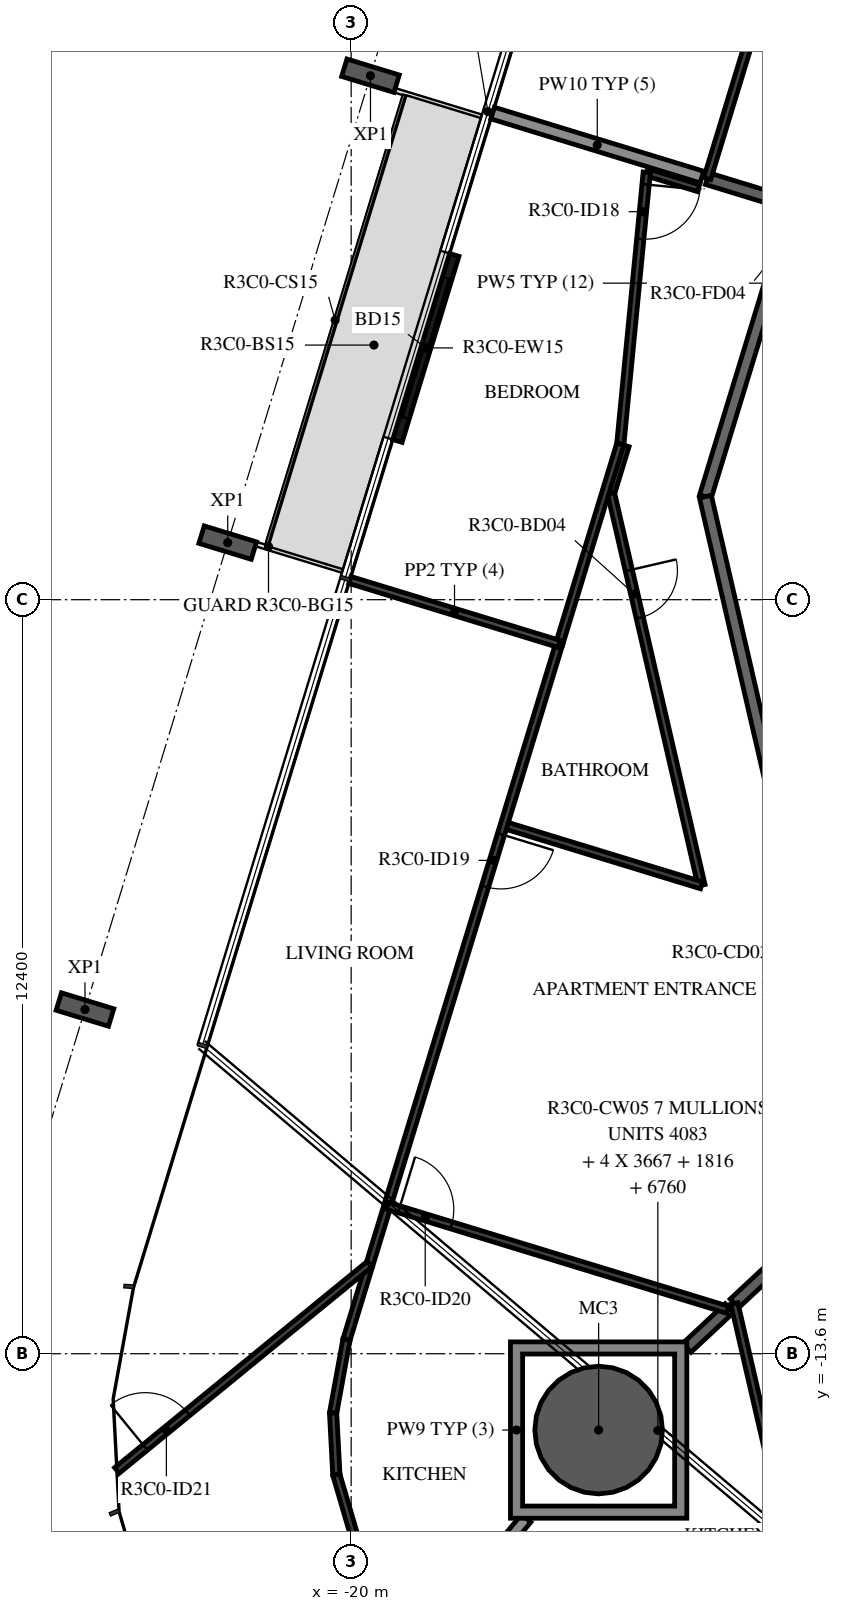
"""IFC4 building model, lengths in metres.
Left out: names, types, materials, properties, quantities, classifications, styles, units other than length and angle.
Written with IfcOpenShell. Run it as: python <this file> out.ifc"""

import sys

from ifc_helpers import new_model, si_unit, direction, frame, frame_2d, origin, origin_2d, place, context, subcontext, project, spatial, polyline, rectangle, hollow_circle, i_section, outline, extrude, element, fill, save


model = new_model("IFC4")
c1 = context("Model", 3, precision=1e-05, world=origin(), true_north=direction((0.0, 1.0)))
c2 = subcontext(c1, "Body", "Model", "MODEL_VIEW")
j1 = project(units=[si_unit("LENGTHUNIT", "METRE"), si_unit("PLANEANGLEUNIT", "RADIAN")], contexts=[c1])
p1 = place(None, origin())
s1 = spatial("IfcSite", under=j1, at=p1, CompositionType="ELEMENT")
p2 = place(p1, origin())
s2 = spatial("IfcBuilding", under=s1, at=p2, CompositionType="ELEMENT")
p3 = place(p2, frame((0.0, 0.0, 134.4)))
s3 = spatial("IfcBuildingStorey", under=s2, at=p3, CompositionType="ELEMENT", Elevation=134.4)
p4 = place(p3, frame((-15.93, -14.855, -0.38), z_axis=(0.0, 0.0, 1.0), x_axis=(1.0, 0.0, 0.0)))
e1 = element("IfcColumn", 1, at=p4, inside=s3, PredefinedType="COLUMN", context=c2, shape_type="SweptSolid", body=[
    extrude(hollow_circle(Radius=1.05, WallThickness=0.05, at=origin_2d()), origin(), (0.0, 0.0, 1.0), 3.5),
])
for number, where, z_axis, x_axis in (
    (2, (-19.682, 7.417, -0.38), (0.0, 0.0, 1.0), (0.292, 0.956, 0.0)),
    (3, (-22.03, -0.261, -0.38), (0.0, 0.0, 1.0), (0.292, 0.956, 0.0)),
    (4, (-24.377, -7.94, -0.38), (0.0, 0.0, 1.0), (0.292, 0.956, 0.0)),
):
    element("IfcColumn", number, at=place(p3, frame(where, z_axis=z_axis, x_axis=x_axis)), inside=s3, PredefinedType="COLUMN", context=c2, shape_type="SweptSolid", body=[
        extrude(i_section(OverallWidth=0.3, OverallDepth=0.9, WebThickness=0.019, FlangeThickness=0.035, FilletRadius=0.03, at=origin_2d()), origin(), (0.0, 0.0, 1.0), 3.5),
    ])
p5 = place(p3, frame((-18.304, 4.47, 0.0), z_axis=(0.0, 0.0, 1.0), x_axis=(-0.292348395078, -0.956311882126, 0.0)))
e5 = element("IfcWall", 5, at=p5, inside=s3, PredefinedType="STANDARD", context=c2, shape_type="SweptSolid", body=[
    extrude(rectangle(XDim=3.2, YDim=0.16, at=frame_2d((1.6, 0.0))), origin(), (0.0, 0.0, 1.0), 3.12),
])
p6 = place(p5, frame((0.4, 0.0, 0.0)))
e6 = element("IfcOpeningElement", 6, at=p6, cuts=e5, PredefinedType="OPENING", context=c2, shape_type="SweptSolid", body=[
    extrude(rectangle(XDim=2.4, YDim=2.4, at=frame_2d((1.2, 1.2))), frame((0.0, 0.09, 0.0), z_axis=(0.0, -1.0, 0.0), x_axis=(1.0, 0.0, 0.0)), (0.0, 0.0, 1.0), 0.18),
])
p7 = place(p3, frame((-12.028, 7.516, 0.0), z_axis=(0.0, 0.0, 1.0), x_axis=(-0.292365533182, -0.956306642771, 0.0)))
e7 = element("IfcWall", 7, at=p7, inside=s3, PredefinedType="STANDARD", context=c2, shape_type="SweptSolid", body=[
    extrude(rectangle(XDim=7.342, YDim=0.2, at=frame_2d((3.671, 0.0))), origin(), (0.0, 0.0, 1.0), 3.12),
])
p8 = place(p7, frame((2.533, 0.0, 0.0)))
e8 = element("IfcOpeningElement", 8, at=p8, cuts=e7, PredefinedType="OPENING", context=c2, shape_type="SweptSolid", body=[
    extrude(rectangle(XDim=1.0, YDim=2.1, at=frame_2d((0.5, 1.05))), frame((0.0, 0.11, 0.0), z_axis=(0.0, -1.0, 0.0), x_axis=(1.0, 0.0, 0.0)), (0.0, 0.0, 1.0), 0.22),
])
p9 = place(p3, frame((-14.175, 0.495, 0.0), z_axis=(0.0, 0.0, 1.0), x_axis=(0.224922649383, -0.974376622151, 0.0)))
e9 = element("IfcWall", 9, at=p9, inside=s3, PredefinedType="STANDARD", context=c2, shape_type="SweptSolid", body=[
    extrude(rectangle(XDim=7.342, YDim=0.2, at=frame_2d((3.671, 0.0))), origin(), (0.0, 0.0, 1.0), 3.12),
])
p10 = place(p3, frame((-14.145, 5.724, 0.0), z_axis=(0.0, 0.0, 1.0), x_axis=(0.956266872747, -0.292495586439, 0.0)))
e10 = element("IfcWall", 10, at=p10, inside=s3, PredefinedType="STANDARD", context=c2, shape_type="SweptSolid", body=[
    extrude(rectangle(XDim=1.5, YDim=0.2, at=frame_2d((0.75, 0.0))), origin(), (0.0, 0.0, 1.0), 3.12),
])
p11 = place(p3, frame((-17.674, 6.803, 0.0), z_axis=(0.0, 0.0, 1.0), x_axis=(0.956293645939, -0.292408041504, 0.0)))
e11 = element("IfcWall", 11, at=p11, inside=s3, PredefinedType="STANDARD", context=c2, shape_type="SweptSolid", body=[
    extrude(rectangle(XDim=3.6, YDim=0.2, at=frame_2d((1.8, 0.0))), origin(), (0.0, 0.0, 1.0), 2.73),
])
p12 = place(p3, frame((-13.699, -12.774, 0.0), z_axis=(0.0, 0.0, 1.0), x_axis=(0.731353758457, 0.681998299111, 0.0)))
e12 = element("IfcWall", 12, at=p12, inside=s3, PredefinedType="STANDARD", context=c2, shape_type="SweptSolid", body=[
    extrude(rectangle(XDim=5.031, YDim=0.2, at=frame_2d((2.515, 0.0))), origin(), (0.0, 0.0, 1.0), 3.12),
])
p13 = place(p3, frame((-21.0, -21.025, 0.0), z_axis=(0.0, 0.0, 1.0), x_axis=(0.634846795952, 0.772638043116, 0.0)))
e13 = element("IfcWall", 13, at=p13, inside=s3, PredefinedType="STANDARD", context=c2, shape_type="SweptSolid", body=[
    extrude(rectangle(XDim=6.109, YDim=0.2, at=frame_2d((3.055, 0.0))), origin(), (0.0, 0.0, 1.0), 2.73),
])
p14 = place(p3, frame((-14.48, -13.503, 0.0), z_axis=(0.0, 0.0, 1.0), x_axis=(0.73152991834, 0.681809341806, 0.0)))
e14 = element("IfcWall", 14, at=p14, inside=s3, PredefinedType="STANDARD", context=c2, shape_type="SweptSolid", body=[
    extrude(rectangle(XDim=0.958, YDim=0.2, at=frame_2d((0.479, 0.0))), origin(), (0.0, 0.0, 1.0), 3.12),
])
p15 = place(p3, frame((-13.345, 8.339, 0.0), z_axis=(0.0, 0.0, 1.0), x_axis=(-0.292316072367, -0.956321762712, 0.0)))
e15 = element("IfcWall", 15, at=p15, inside=s3, PredefinedType="PARTITIONING", context=c2, shape_type="SweptSolid", body=[
    extrude(rectangle(XDim=2.734, YDim=0.12, at=frame_2d((1.367, 0.0))), origin(), (0.0, 0.0, 1.0), 3.12),
])
p16 = place(p3, frame((-14.287, 5.568, 0.0), z_axis=(0.0, 0.0, 1.0), x_axis=(-0.956287662261, 0.292427609859, 0.0)))
e16 = element("IfcWall", 16, at=p16, inside=s3, PredefinedType="PARTITIONING", context=c2, shape_type="SweptSolid", body=[
    extrude(rectangle(XDim=0.89, YDim=0.12, at=frame_2d((0.445, 0.0))), origin(), (0.0, 0.0, 1.0), 3.12),
])
p17 = place(p3, frame((-15.138, 5.828, 0.0), z_axis=(0.0, 0.0, 1.0), x_axis=(-0.096967255409, -0.995287572201, 0.0)))
e17 = element("IfcWall", 17, at=p17, inside=s3, PredefinedType="PARTITIONING", context=c2, shape_type="SweptSolid", body=[
    extrude(rectangle(XDim=4.489, YDim=0.12, at=frame_2d((2.245, 0.0))), origin(), (0.0, 0.0, 1.0), 3.12),
])
p18 = place(p17, frame((0.2, 0.0, 0.0)))
e18 = element("IfcOpeningElement", 18, at=p18, cuts=e17, PredefinedType="OPENING", context=c2, shape_type="SweptSolid", body=[
    extrude(rectangle(XDim=0.9, YDim=2.1, at=frame_2d((0.45, 1.05))), frame((0.0, 0.07, 0.0), z_axis=(0.0, -1.0, 0.0), x_axis=(1.0, 0.0, 0.0)), (0.0, 0.0, 1.0), 0.14),
])
p19 = place(p3, frame((-15.487, 1.333, 0.0), z_axis=(0.0, 0.0, 1.0), x_axis=(-0.2923698127, -0.956305334411, 0.0)))
e19 = element("IfcWall", 19, at=p19, inside=s3, PredefinedType="PARTITIONING", context=c2, shape_type="SweptSolid", body=[
    extrude(rectangle(XDim=0.82, YDim=0.12, at=frame_2d((0.41, 0.0))), origin(), (0.0, 0.0, 1.0), 3.12),
])
p20 = place(p3, frame((-15.727, 0.549, 0.0), z_axis=(0.0, 0.0, 1.0), x_axis=(0.224948441297, -0.974370668051, 0.0)))
e20 = element("IfcWall", 20, at=p20, inside=s3, PredefinedType="PARTITIONING", context=c2, shape_type="SweptSolid", body=[
    extrude(rectangle(XDim=6.616, YDim=0.12, at=frame_2d((3.308, 0.0))), origin(), (0.0, 0.0, 1.0), 3.12),
])
p21 = place(p20, frame((1.3, 0.0, 0.0)))
e21 = element("IfcOpeningElement", 21, at=p21, cuts=e20, PredefinedType="OPENING", context=c2, shape_type="SweptSolid", body=[
    extrude(rectangle(XDim=0.8, YDim=2.1, at=frame_2d((0.4, 1.05))), frame((0.0, 0.07, 0.0), z_axis=(0.0, -1.0, 0.0), x_axis=(1.0, 0.0, 0.0)), (0.0, 0.0, 1.0), 0.14),
])
p22 = place(p3, frame((-14.238, -5.897, 0.0), z_axis=(0.0, 0.0, 1.0), x_axis=(-0.956314762513, 0.292338972768, 0.0)))
e22 = element("IfcWall", 22, at=p22, inside=s3, PredefinedType="PARTITIONING", context=c2, shape_type="SweptSolid", body=[
    extrude(rectangle(XDim=3.399, YDim=0.12, at=frame_2d((1.699, 0.0))), origin(), (0.0, 0.0, 1.0), 3.12),
])
p23 = place(p3, frame((-16.579, -1.928, 0.0), z_axis=(0.0, 0.0, 1.0), x_axis=(-0.29236733738, -0.956306091183, 0.0)))
e23 = element("IfcWall", 23, at=p23, inside=s3, PredefinedType="PARTITIONING", context=c2, shape_type="SweptSolid", body=[
    extrude(rectangle(XDim=11.963, YDim=0.12, at=frame_2d((5.981, 0.0))), origin(), (0.0, 0.0, 1.0), 3.12),
])
p24 = place(p23, frame((3.271, 0.0, 0.0)))
e24 = element("IfcOpeningElement", 24, at=p24, cuts=e23, PredefinedType="OPENING", context=c2, shape_type="SweptSolid", body=[
    extrude(rectangle(XDim=0.9, YDim=2.1, at=frame_2d((0.45, 1.05))), frame((0.0, 0.07, 0.0), z_axis=(0.0, -1.0, 0.0), x_axis=(1.0, 0.0, 0.0)), (0.0, 0.0, 1.0), 0.14),
])
p25 = place(p3, frame((-19.404, -11.167, 0.0), z_axis=(0.0, 0.0, 1.0), x_axis=(0.956314306829, -0.292340463423, 0.0)))
e25 = element("IfcWall", 25, at=p25, inside=s3, PredefinedType="PARTITIONING", context=c2, shape_type="SweptSolid", body=[
    extrude(rectangle(XDim=5.85, YDim=0.12, at=frame_2d((2.925, 0.0))), origin(), (0.0, 0.0, 1.0), 3.12),
])
p26 = place(p25, frame((0.2, 0.0, 0.0)))
e26 = element("IfcOpeningElement", 26, at=p26, cuts=e25, PredefinedType="OPENING", context=c2, shape_type="SweptSolid", body=[
    extrude(rectangle(XDim=0.9, YDim=2.1, at=frame_2d((0.45, 1.05))), frame((0.0, 0.07, 0.0), z_axis=(0.0, -1.0, 0.0), x_axis=(1.0, 0.0, 0.0)), (0.0, 0.0, 1.0), 0.14),
])
p27 = place(p3, frame((-16.579, -1.928, 0.0), z_axis=(0.0, 0.0, 1.0), x_axis=(0.292418780126, 0.956290362301, 0.0)))
e27 = element("IfcWall", 27, at=p27, inside=s3, PredefinedType="PARTITIONING", context=c2, shape_type="SweptSolid", body=[
    extrude(rectangle(XDim=3.438, YDim=0.12, at=frame_2d((1.719, 0.0))), origin(), (0.0, 0.0, 1.0), 3.12),
])
p28 = place(p3, frame((-20.022, -0.875, 0.0), z_axis=(0.0, 0.0, 1.0), x_axis=(0.956306810244, -0.292364985388, 0.0)))
e28 = element("IfcWall", 28, at=p28, inside=s3, PredefinedType="PARTITIONING", context=c2, shape_type="SweptSolid", body=[
    extrude(rectangle(XDim=3.6, YDim=0.12, at=frame_2d((1.8, 0.0))), origin(), (0.0, 0.0, 1.0), 2.73),
])
p29 = place(p3, frame((-23.852, -15.52, 0.0), z_axis=(0.0, 0.0, 1.0), x_axis=(0.774546990858, 0.632516370502, 0.0)))
e29 = element("IfcWall", 29, at=p29, inside=s3, PredefinedType="PARTITIONING", context=c2, shape_type="SweptSolid", body=[
    extrude(rectangle(XDim=5.365, YDim=0.12, at=frame_2d((2.682, 0.0))), origin(), (0.0, 0.0, 1.0), 3.12),
])
p30 = place(p29, frame((0.6, 0.0, 0.0)))
e30 = element("IfcOpeningElement", 30, at=p30, cuts=e29, PredefinedType="OPENING", context=c2, shape_type="SweptSolid", body=[
    extrude(rectangle(XDim=0.9, YDim=2.1, at=frame_2d((0.45, 1.05))), frame((0.0, 0.07, 0.0), z_axis=(0.0, -1.0, 0.0), x_axis=(1.0, 0.0, 0.0)), (0.0, 0.0, 1.0), 0.14),
])
p31 = place(p3, frame((-20.077, -13.368, 0.0), z_axis=(0.0, 0.0, 1.0), x_axis=(-0.179288174895, -0.983796600087, 0.0)))
e31 = element("IfcWall", 31, at=p31, inside=s3, PredefinedType="PARTITIONING", context=c2, shape_type="SweptSolid", body=[
    extrude(rectangle(XDim=1.227, YDim=0.12, at=frame_2d((0.613, 0.0))), origin(), (0.0, 0.0, 1.0), 3.12),
])
p32 = place(p3, frame((-20.297, -14.575, 0.0), z_axis=(0.0, 0.0, 1.0), x_axis=(0.052142637988, -0.998639647372, 0.0)))
e32 = element("IfcWall", 32, at=p32, inside=s3, PredefinedType="PARTITIONING", context=c2, shape_type="SweptSolid", body=[
    extrude(rectangle(XDim=1.016, YDim=0.12, at=frame_2d((0.508, 0.0))), origin(), (0.0, 0.0, 1.0), 3.12),
])
p33 = place(p3, frame((-20.244, -15.59, 0.0), z_axis=(0.0, 0.0, 1.0), x_axis=(0.281411609627, -0.959587153919, 0.0)))
e33 = element("IfcWall", 33, at=p33, inside=s3, PredefinedType="PARTITIONING", context=c2, shape_type="SweptSolid", body=[
    extrude(rectangle(XDim=1.016, YDim=0.12, at=frame_2d((0.508, 0.0))), origin(), (0.0, 0.0, 1.0), 3.12),
])
p34 = place(p3, frame((-12.366, -18.548, 0.0), z_axis=(0.0, 0.0, 1.0), x_axis=(-0.224958805164, 0.974368275335, 0.0)))
e34 = element("IfcWall", 34, at=p34, inside=s3, PredefinedType="PARTITIONING", context=c2, shape_type="SweptSolid", body=[
    extrude(rectangle(XDim=5.926, YDim=0.12, at=frame_2d((2.963, 0.0))), origin(), (0.0, 0.0, 1.0), 3.12),
])
p35 = place(p34, frame((0.2, 0.0, 0.0)))
e35 = element("IfcOpeningElement", 35, at=p35, cuts=e34, PredefinedType="OPENING", context=c2, shape_type="SweptSolid", body=[
    extrude(rectangle(XDim=0.9, YDim=2.1, at=frame_2d((0.45, 1.05))), frame((0.0, 0.07, 0.0), z_axis=(0.0, -1.0, 0.0), x_axis=(1.0, 0.0, 0.0)), (0.0, 0.0, 1.0), 0.14),
])
p36 = place(p3, frame((-14.736, -19.095, 0.0), z_axis=(0.0, 0.0, 1.0), x_axis=(0.974368335243, 0.224958545682, 0.0)))
e36 = element("IfcWall", 36, at=p36, inside=s3, PredefinedType="PARTITIONING", context=c2, shape_type="SweptSolid", body=[
    extrude(rectangle(XDim=19.263, YDim=0.12, at=frame_2d((9.632, 0.0))), origin(), (0.0, 0.0, 1.0), 3.12),
])
p37 = place(p36, frame((2.993, 0.0, 0.0)))
e37 = element("IfcOpeningElement", 37, at=p37, cuts=e36, PredefinedType="OPENING", context=c2, shape_type="SweptSolid", body=[
    extrude(rectangle(XDim=0.9, YDim=2.1, at=frame_2d((0.45, 1.05))), frame((0.0, 0.07, 0.0), z_axis=(0.0, -1.0, 0.0), x_axis=(1.0, 0.0, 0.0)), (0.0, 0.0, 1.0), 0.14),
])
p38 = place(p36, frame((6.81, 0.0, 0.0)))
e38 = element("IfcOpeningElement", 38, at=p38, cuts=e36, PredefinedType="OPENING", context=c2, shape_type="SweptSolid", body=[
    extrude(rectangle(XDim=0.9, YDim=2.1, at=frame_2d((0.45, 1.05))), frame((0.0, 0.07, 0.0), z_axis=(0.0, -1.0, 0.0), x_axis=(1.0, 0.0, 0.0)), (0.0, 0.0, 1.0), 0.14),
])
p39 = place(p36, frame((0.2, 0.0, 0.0)))
e39 = element("IfcOpeningElement", 39, at=p39, cuts=e36, PredefinedType="OPENING", context=c2, shape_type="SweptSolid", body=[
    extrude(rectangle(XDim=0.9, YDim=2.1, at=frame_2d((0.45, 1.05))), frame((0.0, 0.07, 0.0), z_axis=(0.0, -1.0, 0.0), x_axis=(1.0, 0.0, 0.0)), (0.0, 0.0, 1.0), 0.14),
])
p40 = place(p36, frame((14.839, 0.0, 0.0)))
e40 = element("IfcOpeningElement", 40, at=p40, cuts=e36, PredefinedType="OPENING", context=c2, shape_type="SweptSolid", body=[
    extrude(rectangle(XDim=0.9, YDim=2.1, at=frame_2d((0.45, 1.05))), frame((0.0, 0.07, 0.0), z_axis=(0.0, -1.0, 0.0), x_axis=(1.0, 0.0, 0.0)), (0.0, 0.0, 1.0), 0.14),
])
p41 = place(p3, origin())
e41 = element("IfcWall", 41, at=p41, inside=s3, PredefinedType="STANDARD", context=c2, shape_type="SweptSolid", body=[
    extrude(outline(polyline([(-14.48, -13.405), (-14.48, -16.305), (-17.38, -16.305), (-17.38, -13.405), (-14.48, -13.405)]), holes=[polyline([(-17.18, -16.105), (-14.68, -16.105), (-14.68, -13.605), (-17.18, -13.605), (-17.18, -16.105)])]), origin(), (0.0, 0.0, 1.0), 3.12),
])
p42 = place(p6, origin())
e42 = element("IfcDoor", 42, at=p42, inside=s3, OperationType="DOUBLE_DOOR_SLIDING", PredefinedType="DOOR", context=c2, shape_type="SweptSolid", body=[
    extrude(rectangle(XDim=2.4, YDim=2.4, at=frame_2d((1.2, 1.2))), frame((0.0, 0.025, 0.0), z_axis=(0.0, -1.0, 0.0), x_axis=(1.0, 0.0, 0.0)), (0.0, 0.0, 1.0), 0.05),
])
fill(e6, e42)
p43 = place(p18, origin())
e43 = element("IfcDoor", 43, at=p43, inside=s3, OperationType="SINGLE_SWING_LEFT", PredefinedType="DOOR", context=c2, shape_type="SweptSolid", body=[
    extrude(rectangle(XDim=0.9, YDim=2.1, at=frame_2d((0.45, 1.05))), frame((0.0, 0.025, 0.0), z_axis=(0.0, -1.0, 0.0), x_axis=(1.0, 0.0, 0.0)), (0.0, 0.0, 1.0), 0.05),
])
fill(e18, e43)
p44 = place(p21, origin())
e44 = element("IfcDoor", 44, at=p44, inside=s3, OperationType="SINGLE_SWING_RIGHT", PredefinedType="DOOR", context=c2, shape_type="SweptSolid", body=[
    extrude(rectangle(XDim=0.8, YDim=2.1, at=frame_2d((0.4, 1.05))), frame((0.0, 0.025, 0.0), z_axis=(0.0, -1.0, 0.0), x_axis=(1.0, 0.0, 0.0)), (0.0, 0.0, 1.0), 0.05),
])
fill(e21, e44)
p45 = place(p24, origin())
e45 = element("IfcDoor", 45, at=p45, inside=s3, OperationType="SINGLE_SWING_RIGHT", PredefinedType="DOOR", context=c2, shape_type="SweptSolid", body=[
    extrude(rectangle(XDim=0.9, YDim=2.1, at=frame_2d((0.45, 1.05))), frame((0.0, 0.025, 0.0), z_axis=(0.0, -1.0, 0.0), x_axis=(1.0, 0.0, 0.0)), (0.0, 0.0, 1.0), 0.05),
])
fill(e24, e45)
p46 = place(p26, origin())
e46 = element("IfcDoor", 46, at=p46, inside=s3, OperationType="SINGLE_SWING_RIGHT", PredefinedType="DOOR", context=c2, shape_type="SweptSolid", body=[
    extrude(rectangle(XDim=0.9, YDim=2.1, at=frame_2d((0.45, 1.05))), frame((0.0, 0.025, 0.0), z_axis=(0.0, -1.0, 0.0), x_axis=(1.0, 0.0, 0.0)), (0.0, 0.0, 1.0), 0.05),
])
fill(e26, e46)
p47 = place(p30, origin())
e47 = element("IfcDoor", 47, at=p47, inside=s3, OperationType="SINGLE_SWING_RIGHT", PredefinedType="DOOR", context=c2, shape_type="SweptSolid", body=[
    extrude(rectangle(XDim=0.9, YDim=2.1, at=frame_2d((0.45, 1.05))), frame((0.0, 0.025, 0.0), z_axis=(0.0, -1.0, 0.0), x_axis=(1.0, 0.0, 0.0)), (0.0, 0.0, 1.0), 0.05),
])
fill(e30, e47)
save(model, sys.argv[1])
